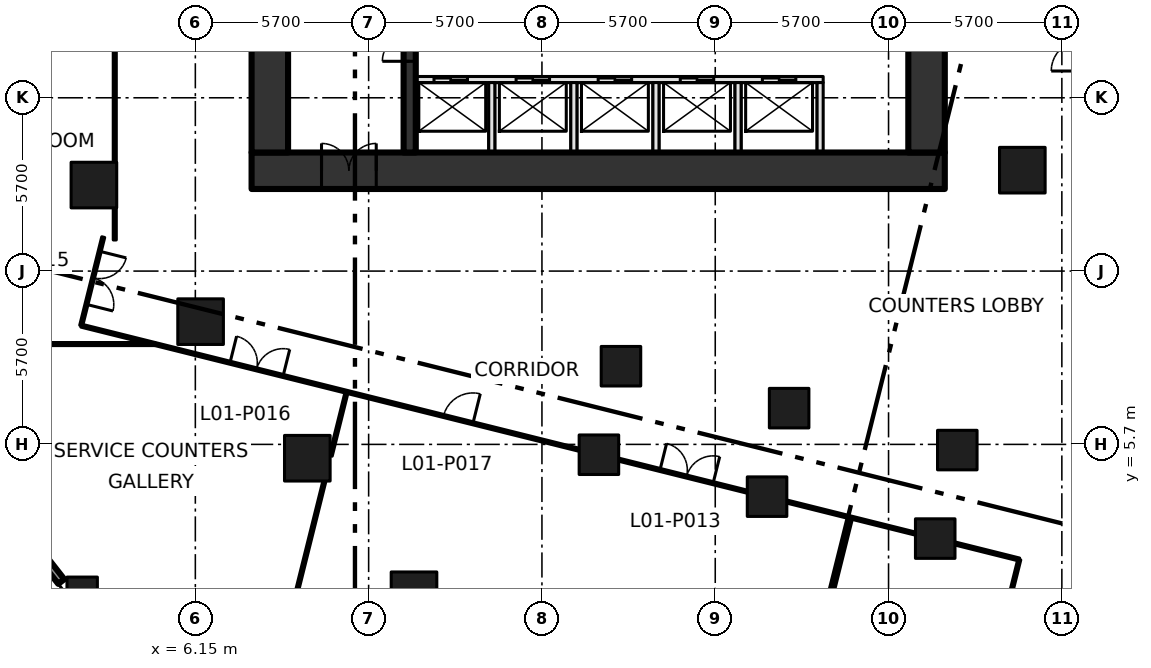
"""IFC4 building model, lengths in metres.
Left out: names, types, materials, properties, quantities, classifications, styles, units other than length and angle.
Written with IfcOpenShell. Run it as: python <this file> out.ifc"""

import sys

from ifc_helpers import new_model, si_unit, direction, frame, frame_2d, origin, origin_2d, place, context, subcontext, project, spatial, rectangle, extrude, element, fill, save


model = new_model("IFC4")
c1 = context("Model", 3, precision=1e-05, world=origin(), true_north=direction((0.0, 1.0)))
c2 = subcontext(c1, "Body", "Model", "MODEL_VIEW")
j1 = project(units=[si_unit("LENGTHUNIT", "METRE"), si_unit("PLANEANGLEUNIT", "RADIAN")], contexts=[c1])
p1 = place(None, origin())
s1 = spatial("IfcSite", under=j1, at=p1, CompositionType="ELEMENT")
p2 = place(p1, origin())
s2 = spatial("IfcBuilding", under=s1, at=p2, CompositionType="ELEMENT")
p3 = place(p2, frame((0.0, 0.0, 7.2)))
s3 = spatial("IfcBuildingStorey", under=s2, at=p3, CompositionType="ELEMENT", Elevation=7.2)
for number, where, z_axis, x_axis in (
    (1, (33.35, 14.719, 0.0), (0.0, 0.0, 1.0), (1.0, 0.0, 0.0)),
    (2, (13.342, 0.754, 0.0), (0.0, 0.0, 1.0), (1.0, 0.0, 0.0)),
    (3, (9.833, 5.245, 0.0), (0.0, 0.0, 1.0), (1.0, 0.0, 0.0)),
    (4, (6.323, 9.737, 0.0), (0.0, 0.0, 1.0), (1.0, 0.0, 0.0)),
    (5, (2.814, 14.229, 0.0), (0.0, 0.0, 1.0), (1.0, 0.0, 0.0)),
):
    element("IfcColumn", number, at=place(p3, frame(where, z_axis=z_axis, x_axis=x_axis)), inside=s3, PredefinedType="COLUMN", context=c2, shape_type="SweptSolid", body=[
        extrude(rectangle(XDim=1.5, YDim=1.5, at=origin_2d()), origin(), (0.0, 0.0, 1.0), 5.4),
    ])
for number, where, z_axis, x_axis in (
    (6, (19.424, 5.36, 0.0), (0.0, 0.0, 1.0), (1.0, 0.0, 0.0)),
    (7, (24.954, 3.981, 0.0), (0.0, 0.0, 1.0), (1.0, 0.0, 0.0)),
    (8, (30.485, 2.602, 0.0), (0.0, 0.0, 1.0), (1.0, 0.0, 0.0)),
    (9, (20.149, 8.271, 0.0), (0.0, 0.0, 1.0), (1.0, 0.0, 0.0)),
    (10, (25.68, 6.892, 0.0), (0.0, 0.0, 1.0), (1.0, 0.0, 0.0)),
    (11, (31.211, 5.513, 0.0), (0.0, 0.0, 1.0), (1.0, 0.0, 0.0)),
):
    element("IfcColumn", number, at=place(p3, frame(where, z_axis=z_axis, x_axis=x_axis)), inside=s3, PredefinedType="COLUMN", context=c2, shape_type="SweptSolid", body=[
        extrude(rectangle(XDim=1.3, YDim=1.3, at=origin_2d()), origin(), (0.0, 0.0, 1.0), 5.4),
    ])
p4 = place(p3, frame((2.428, 0.836, 0.0), z_axis=(0.0, 0.0, 1.0), x_axis=(1.0, 0.0, 0.0)))
e12 = element("IfcColumn", 12, at=p4, inside=s3, PredefinedType="COLUMN", context=c2, shape_type="SweptSolid", body=[
    extrude(rectangle(XDim=1.0, YDim=1.0, at=origin_2d()), origin(), (0.0, 0.0, 1.0), 5.4),
])
p5 = place(p3, frame((8.0, 14.7, -0.45), z_axis=(0.0, 0.0, 1.0), x_axis=(1.0, 0.0, 0.0)))
e13 = element("IfcWall", 13, at=p5, inside=s3, PredefinedType="SHEAR", context=c2, shape_type="SweptSolid", body=[
    extrude(rectangle(XDim=22.8, YDim=1.2, at=frame_2d((11.4, 0.0))), origin(), (0.0, 0.0, 1.0), 5.4),
])
p6 = place(p5, frame((2.3, 0.0, 0.45)))
e14 = element("IfcOpeningElement", 14, at=p6, cuts=e13, PredefinedType="OPENING", context=c2, shape_type="SweptSolid", body=[
    extrude(rectangle(XDim=1.8, YDim=2.1, at=frame_2d((0.9, 1.05))), frame((0.0, 0.61, 0.0), z_axis=(0.0, -1.0, 0.0), x_axis=(1.0, 0.0, 0.0)), (0.0, 0.0, 1.0), 1.22),
])
for number, where, z_axis, x_axis in (
    (15, (8.6, 15.3, -0.45), (0.0, 0.0, 1.0), (0.0, 1.0, 0.0)),
    (16, (30.2, 15.3, -0.45), (0.0, 0.0, 1.0), (0.0, 1.0, 0.0)),
):
    element("IfcWall", number, at=place(p3, frame(where, z_axis=z_axis, x_axis=x_axis)), inside=s3, PredefinedType="SHEAR", context=c2, shape_type="SweptSolid", body=[
        extrude(rectangle(XDim=20.4, YDim=1.2, at=frame_2d((10.2, 0.0))), origin(), (0.0, 0.0, 1.0), 5.4),
    ])
p7 = place(p3, frame((13.4, 17.7, 0.0), z_axis=(0.0, 0.0, 1.0), x_axis=(1.0, 0.0, 0.0)))
e17 = element("IfcWall", 17, at=p7, inside=s3, PredefinedType="SOLIDWALL", context=c2, shape_type="SweptSolid", body=[
    extrude(rectangle(XDim=13.4, YDim=0.2, at=frame_2d((6.7, 0.0))), origin(), (0.0, 0.0, 1.0), 4.95),
])
p8 = place(p7, frame((0.6, 0.0, 0.0)))
e18 = element("IfcOpeningElement", 18, at=p8, cuts=e17, PredefinedType="OPENING", context=c2, shape_type="SweptSolid", body=[
    extrude(rectangle(XDim=1.1, YDim=2.1, at=frame_2d((0.55, 1.05))), frame((0.0, 0.11, 0.0), z_axis=(0.0, -1.0, 0.0), x_axis=(1.0, 0.0, 0.0)), (0.0, 0.0, 1.0), 0.22),
])
p9 = place(p7, frame((3.3, 0.0, 0.0)))
e19 = element("IfcOpeningElement", 19, at=p9, cuts=e17, PredefinedType="OPENING", context=c2, shape_type="SweptSolid", body=[
    extrude(rectangle(XDim=1.1, YDim=2.1, at=frame_2d((0.55, 1.05))), frame((0.0, 0.11, 0.0), z_axis=(0.0, -1.0, 0.0), x_axis=(1.0, 0.0, 0.0)), (0.0, 0.0, 1.0), 0.22),
])
p10 = place(p7, frame((6.0, 0.0, 0.0)))
e20 = element("IfcOpeningElement", 20, at=p10, cuts=e17, PredefinedType="OPENING", context=c2, shape_type="SweptSolid", body=[
    extrude(rectangle(XDim=1.1, YDim=2.1, at=frame_2d((0.55, 1.05))), frame((0.0, 0.11, 0.0), z_axis=(0.0, -1.0, 0.0), x_axis=(1.0, 0.0, 0.0)), (0.0, 0.0, 1.0), 0.22),
])
p11 = place(p7, frame((8.7, 0.0, 0.0)))
e21 = element("IfcOpeningElement", 21, at=p11, cuts=e17, PredefinedType="OPENING", context=c2, shape_type="SweptSolid", body=[
    extrude(rectangle(XDim=1.1, YDim=2.1, at=frame_2d((0.55, 1.05))), frame((0.0, 0.11, 0.0), z_axis=(0.0, -1.0, 0.0), x_axis=(1.0, 0.0, 0.0)), (0.0, 0.0, 1.0), 0.22),
])
p12 = place(p7, frame((11.4, 0.0, 0.0)))
e22 = element("IfcOpeningElement", 22, at=p12, cuts=e17, PredefinedType="OPENING", context=c2, shape_type="SweptSolid", body=[
    extrude(rectangle(XDim=1.1, YDim=2.1, at=frame_2d((0.55, 1.05))), frame((0.0, 0.11, 0.0), z_axis=(0.0, -1.0, 0.0), x_axis=(1.0, 0.0, 0.0)), (0.0, 0.0, 1.0), 0.22),
])
p13 = place(p3, frame((13.2, 15.3, 0.0), z_axis=(0.0, 0.0, 1.0), x_axis=(0.0, 1.0, 0.0)))
e23 = element("IfcWall", 23, at=p13, inside=s3, PredefinedType="SHEAR", context=c2, shape_type="SweptSolid", body=[
    extrude(rectangle(XDim=20.4, YDim=0.4, at=frame_2d((10.2, 0.0))), origin(), (0.0, 0.0, 1.0), 4.95),
])
p14 = place(p13, frame((3.0, 0.0, 0.0)))
e24 = element("IfcOpeningElement", 24, at=p14, cuts=e23, PredefinedType="OPENING", context=c2, shape_type="SweptSolid", body=[
    extrude(rectangle(XDim=1.8, YDim=2.1, at=frame_2d((0.9, 1.05))), frame((0.0, 0.21, 0.0), z_axis=(0.0, -1.0, 0.0), x_axis=(1.0, 0.0, 0.0)), (0.0, 0.0, 1.0), 0.42),
])
p15 = place(p13, frame((11.1, 0.0, 0.0)))
e25 = element("IfcOpeningElement", 25, at=p15, cuts=e23, PredefinedType="OPENING", context=c2, shape_type="SweptSolid", body=[
    extrude(rectangle(XDim=1.2, YDim=2.1, at=frame_2d((0.6, 1.05))), frame((0.0, 0.21, 0.0), z_axis=(0.0, -1.0, 0.0), x_axis=(1.0, 0.0, 0.0)), (0.0, 0.0, 1.0), 0.42),
])
for number, where, z_axis, x_axis in (
    (26, (15.9, 15.3, 0.0), (0.0, 0.0, 1.0), (0.0, 1.0, 0.0)),
    (27, (18.6, 15.3, 0.0), (0.0, 0.0, 1.0), (0.0, 1.0, 0.0)),
    (28, (21.3, 15.3, 0.0), (0.0, 0.0, 1.0), (0.0, 1.0, 0.0)),
    (29, (24.0, 15.3, 0.0), (0.0, 0.0, 1.0), (0.0, 1.0, 0.0)),
    (30, (26.7, 15.3, 0.0), (0.0, 0.0, 1.0), (0.0, 1.0, 0.0)),
):
    element("IfcWall", number, at=place(p3, frame(where, z_axis=z_axis, x_axis=x_axis)), inside=s3, PredefinedType="SOLIDWALL", context=c2, shape_type="SweptSolid", body=[
        extrude(rectangle(XDim=2.3, YDim=0.2, at=frame_2d((1.15, 0.0))), origin(), (0.0, 0.0, 1.0), 4.95),
    ])
p16 = place(p3, frame((2.395, 9.606, 0.0), z_axis=(0.0, 0.0, 1.0), x_axis=(0.970307527636, -0.241874558011, 0.0)))
e31 = element("IfcWall", 31, at=p16, inside=s3, PredefinedType="PARTITIONING", context=c2, shape_type="SweptSolid", body=[
    extrude(rectangle(XDim=16.859, YDim=0.1, at=frame_2d((8.43, 0.0))), origin(), (0.0, 0.0, 1.0), 4.95),
])
p17 = place(p16, frame((5.045, 0.0, 0.0)))
e32 = element("IfcOpeningElement", 32, at=p17, cuts=e31, PredefinedType="OPENING", context=c2, shape_type="SweptSolid", body=[
    extrude(rectangle(XDim=1.8, YDim=2.1, at=frame_2d((0.9, 1.05))), frame((0.0, 0.06, 0.0), z_axis=(0.0, -1.0, 0.0), x_axis=(1.0, 0.0, 0.0)), (0.0, 0.0, 1.0), 0.12),
])
p18 = place(p16, frame((12.28, 0.0, 0.0)))
e33 = element("IfcOpeningElement", 33, at=p18, cuts=e31, PredefinedType="OPENING", context=c2, shape_type="SweptSolid", body=[
    extrude(rectangle(XDim=1.0, YDim=2.1, at=frame_2d((0.5, 1.05))), frame((0.0, 0.06, 0.0), z_axis=(0.0, -1.0, 0.0), x_axis=(1.0, 0.0, 0.0)), (0.0, 0.0, 1.0), 0.12),
])
p19 = place(p3, frame((3.121, 12.517, 0.0), z_axis=(0.0, 0.0, 1.0), x_axis=(-0.241999491975, -0.970276376031, 0.0)))
e34 = element("IfcWall", 34, at=p19, inside=s3, PredefinedType="PARTITIONING", context=c2, shape_type="SweptSolid", body=[
    extrude(rectangle(XDim=3.0, YDim=0.1, at=frame_2d((1.5, 0.0))), origin(), (0.0, 0.0, 1.0), 4.95),
])
p20 = place(p19, frame((0.48, 0.0, 0.0)))
e35 = element("IfcOpeningElement", 35, at=p20, cuts=e34, PredefinedType="OPENING", context=c2, shape_type="SweptSolid", body=[
    extrude(rectangle(XDim=1.8, YDim=2.1, at=frame_2d((0.9, 1.05))), frame((0.0, 0.06, 0.0), z_axis=(0.0, -1.0, 0.0), x_axis=(1.0, 0.0, 0.0)), (0.0, 0.0, 1.0), 0.12),
])
p21 = place(p3, frame((3.5, 13.459, 0.0), z_axis=(0.0, 0.0, 1.0), x_axis=(0.0, -1.0, 0.0)))
e36 = element("IfcWall", 36, at=p21, inside=s3, PredefinedType="PARTITIONING", context=c2, shape_type="SweptSolid", body=[
    extrude(rectangle(XDim=1.036, YDim=0.1, at=frame_2d((0.518, 0.0))), origin(), (0.0, 0.0, 1.0), 4.95),
])
p22 = place(p3, frame((3.5, 14.999, 0.0), z_axis=(0.0, 0.0, 1.0), x_axis=(0.0, 1.0, 0.0)))
e37 = element("IfcWall", 37, at=p22, inside=s3, PredefinedType="PARTITIONING", context=c2, shape_type="SweptSolid", body=[
    extrude(rectangle(XDim=26.401, YDim=0.1, at=frame_2d((13.2, 0.0))), origin(), (0.0, 0.0, 1.0), 4.95),
])
p23 = place(p22, frame((9.881, 0.0, 0.0)))
e38 = element("IfcOpeningElement", 38, at=p23, cuts=e37, PredefinedType="OPENING", context=c2, shape_type="SweptSolid", body=[
    extrude(rectangle(XDim=1.8, YDim=2.1, at=frame_2d((0.9, 1.05))), frame((0.0, 0.06, 0.0), z_axis=(0.0, -1.0, 0.0), x_axis=(1.0, 0.0, 0.0)), (0.0, 0.0, 1.0), 0.12),
])
p24 = place(p22, frame((19.081, 0.0, 0.0)))
e39 = element("IfcOpeningElement", 39, at=p24, cuts=e37, PredefinedType="OPENING", context=c2, shape_type="SweptSolid", body=[
    extrude(rectangle(XDim=1.0, YDim=2.1, at=frame_2d((0.5, 1.05))), frame((0.0, 0.06, 0.0), z_axis=(0.0, -1.0, 0.0), x_axis=(1.0, 0.0, 0.0)), (0.0, 0.0, 1.0), 0.12),
])
p25 = place(p22, frame((23.581, 0.0, 0.0)))
e40 = element("IfcOpeningElement", 40, at=p25, cuts=e37, PredefinedType="OPENING", context=c2, shape_type="SweptSolid", body=[
    extrude(rectangle(XDim=1.8, YDim=2.1, at=frame_2d((0.9, 1.05))), frame((0.0, 0.06, 0.0), z_axis=(0.0, -1.0, 0.0), x_axis=(1.0, 0.0, 0.0)), (0.0, 0.0, 1.0), 0.12),
])
p26 = place(p3, frame((20.094, 5.193, 0.0), z_axis=(0.0, 0.0, 1.0), x_axis=(0.970321828551, -0.241817181023, 0.0)))
e41 = element("IfcWall", 41, at=p26, inside=s3, PredefinedType="PARTITIONING", context=c2, shape_type="SweptSolid", body=[
    extrude(rectangle(XDim=4.318, YDim=0.1, at=frame_2d((2.159, 0.0))), origin(), (0.0, 0.0, 1.0), 4.95),
])
p27 = place(p26, frame((1.38, 0.0, 0.0)))
e42 = element("IfcOpeningElement", 42, at=p27, cuts=e41, PredefinedType="OPENING", context=c2, shape_type="SweptSolid", body=[
    extrude(rectangle(XDim=1.8, YDim=2.1, at=frame_2d((0.9, 1.05))), frame((0.0, 0.06, 0.0), z_axis=(0.0, -1.0, 0.0), x_axis=(1.0, 0.0, 0.0)), (0.0, 0.0, 1.0), 0.12),
])
p28 = place(p3, frame((25.624, 3.815, 0.0), z_axis=(0.0, 0.0, 1.0), x_axis=(0.970295255208, -0.241923784941, 0.0)))
e43 = element("IfcWall", 43, at=p28, inside=s3, PredefinedType="PARTITIONING", context=c2, shape_type="SweptSolid", body=[
    extrude(rectangle(XDim=4.319, YDim=0.1, at=frame_2d((2.16, 0.0))), origin(), (0.0, 0.0, 1.0), 4.95),
])
p29 = place(p3, frame((31.155, 2.436, 0.0), z_axis=(0.0, 0.0, 1.0), x_axis=(0.970255412337, -0.242083528623, 0.0)))
e44 = element("IfcWall", 44, at=p29, inside=s3, PredefinedType="PARTITIONING", context=c2, shape_type="SweptSolid", body=[
    extrude(rectangle(XDim=2.16, YDim=0.1, at=frame_2d((1.08, 0.0))), origin(), (0.0, 0.0, 1.0), 4.95),
])
p30 = place(p3, frame((33.251, 1.913, 0.0), z_axis=(0.0, 0.0, 1.0), x_axis=(-0.241952442696, -0.970288109519, 0.0)))
e45 = element("IfcWall", 45, at=p30, inside=s3, PredefinedType="PARTITIONING", context=c2, shape_type="SweptSolid", body=[
    extrude(rectangle(XDim=6.6, YDim=0.1, at=frame_2d((3.3, 0.0))), origin(), (0.0, 0.0, 1.0), 4.95),
])
p31 = place(p3, frame((-4.205, 9.0, 0.0), z_axis=(0.0, 0.0, 1.0), x_axis=(1.0, 0.0, 0.0)))
e46 = element("IfcWall", 46, at=p31, inside=s3, PredefinedType="PARTITIONING", context=c2, shape_type="SweptSolid", body=[
    extrude(rectangle(XDim=9.031, YDim=0.1, at=frame_2d((4.515, 0.0))), origin(), (0.0, 0.0, 1.0), 4.95),
])
p32 = place(p3, frame((7.716, -6.257, 0.0), z_axis=(0.0, 0.0, 1.0), x_axis=(0.241891576484, 0.970303285177, 0.0)))
e47 = element("IfcWall", 47, at=p32, inside=s3, PredefinedType="PARTITIONING", context=c2, shape_type="SweptSolid", body=[
    extrude(rectangle(XDim=11.061, YDim=0.1, at=frame_2d((5.53, 0.0))), origin(), (0.0, 0.0, 1.0), 4.95),
])
p33 = place(p3, frame((10.603, 5.323, 0.0), z_axis=(0.0, 0.0, 1.0), x_axis=(0.241966521302, 0.970284598749, 0.0)))
e48 = element("IfcWall", 48, at=p33, inside=s3, PredefinedType="PARTITIONING", context=c2, shape_type="SweptSolid", body=[
    extrude(rectangle(XDim=2.12, YDim=0.1, at=frame_2d((1.06, 0.0))), origin(), (0.0, 0.0, 1.0), 4.95),
])
p34 = place(p3, frame((23.507, -13.601, 0.0), z_axis=(0.0, 0.0, 1.0), x_axis=(0.24198959429, 0.970278844588, 0.0)))
e49 = element("IfcWall", 49, at=p34, inside=s3, PredefinedType="PARTITIONING", context=c2, shape_type="SweptSolid", body=[
    extrude(rectangle(XDim=17.36, YDim=0.1, at=frame_2d((8.68, 0.0))), origin(), (0.0, 0.0, 1.0), 4.95),
])
p35 = place(p3, frame((-0.906, 4.575, 0.0), z_axis=(0.0, 0.0, 1.0), x_axis=(0.61574436495, -0.787945986113, 0.0)))
e50 = element("IfcWall", 50, at=p35, inside=s3, PredefinedType="SOLIDWALL", context=c2, shape_type="SweptSolid", body=[
    extrude(rectangle(XDim=4.297, YDim=0.25, at=frame_2d((2.148, 0.0))), origin(), (0.0, 0.0, 1.0), 4.05),
])
p36 = place(p35, frame((0.949, 0.0, 0.9)))
e51 = element("IfcOpeningElement", 51, at=p36, cuts=e50, PredefinedType="OPENING", context=c2, shape_type="SweptSolid", body=[
    extrude(rectangle(XDim=2.4, YDim=2.7, at=frame_2d((1.2, 1.35))), frame((0.0, 0.135, 0.0), z_axis=(0.0, -1.0, 0.0), x_axis=(1.0, 0.0, 0.0)), (0.0, 0.0, 1.0), 0.27),
])
p37 = place(p8, origin())
e52 = element("IfcDoor", 52, at=p37, inside=s3, OperationType="SLIDING_TO_LEFT", PredefinedType="DOOR", context=c2, shape_type="SweptSolid", body=[
    extrude(rectangle(XDim=1.1, YDim=2.1, at=frame_2d((0.55, 1.05))), frame((0.0, 0.025, 0.0), z_axis=(0.0, -1.0, 0.0), x_axis=(1.0, 0.0, 0.0)), (0.0, 0.0, 1.0), 0.05),
])
fill(e18, e52)
p38 = place(p9, origin())
e53 = element("IfcDoor", 53, at=p38, inside=s3, OperationType="SLIDING_TO_LEFT", PredefinedType="DOOR", context=c2, shape_type="SweptSolid", body=[
    extrude(rectangle(XDim=1.1, YDim=2.1, at=frame_2d((0.55, 1.05))), frame((0.0, 0.025, 0.0), z_axis=(0.0, -1.0, 0.0), x_axis=(1.0, 0.0, 0.0)), (0.0, 0.0, 1.0), 0.05),
])
fill(e19, e53)
p39 = place(p10, origin())
e54 = element("IfcDoor", 54, at=p39, inside=s3, OperationType="SLIDING_TO_LEFT", PredefinedType="DOOR", context=c2, shape_type="SweptSolid", body=[
    extrude(rectangle(XDim=1.1, YDim=2.1, at=frame_2d((0.55, 1.05))), frame((0.0, 0.025, 0.0), z_axis=(0.0, -1.0, 0.0), x_axis=(1.0, 0.0, 0.0)), (0.0, 0.0, 1.0), 0.05),
])
fill(e20, e54)
p40 = place(p11, origin())
e55 = element("IfcDoor", 55, at=p40, inside=s3, OperationType="SLIDING_TO_LEFT", PredefinedType="DOOR", context=c2, shape_type="SweptSolid", body=[
    extrude(rectangle(XDim=1.1, YDim=2.1, at=frame_2d((0.55, 1.05))), frame((0.0, 0.025, 0.0), z_axis=(0.0, -1.0, 0.0), x_axis=(1.0, 0.0, 0.0)), (0.0, 0.0, 1.0), 0.05),
])
fill(e21, e55)
p41 = place(p12, origin())
e56 = element("IfcDoor", 56, at=p41, inside=s3, OperationType="SLIDING_TO_LEFT", PredefinedType="DOOR", context=c2, shape_type="SweptSolid", body=[
    extrude(rectangle(XDim=1.1, YDim=2.1, at=frame_2d((0.55, 1.05))), frame((0.0, 0.025, 0.0), z_axis=(0.0, -1.0, 0.0), x_axis=(1.0, 0.0, 0.0)), (0.0, 0.0, 1.0), 0.05),
])
fill(e22, e56)
p42 = place(p14, origin())
e57 = element("IfcDoor", 57, at=p42, inside=s3, OperationType="DOUBLE_DOOR_SINGLE_SWING", PredefinedType="DOOR", context=c2, shape_type="SweptSolid", body=[
    extrude(rectangle(XDim=1.8, YDim=2.1, at=frame_2d((0.9, 1.05))), frame((0.0, 0.025, 0.0), z_axis=(0.0, -1.0, 0.0), x_axis=(1.0, 0.0, 0.0)), (0.0, 0.0, 1.0), 0.05),
])
fill(e24, e57)
p43 = place(p6, origin())
e58 = element("IfcDoor", 58, at=p43, inside=s3, OperationType="DOUBLE_DOOR_SINGLE_SWING", PredefinedType="DOOR", context=c2, shape_type="SweptSolid", body=[
    extrude(rectangle(XDim=1.8, YDim=2.1, at=frame_2d((0.9, 1.05))), frame((0.0, 0.025, 0.0), z_axis=(0.0, -1.0, 0.0), x_axis=(1.0, 0.0, 0.0)), (0.0, 0.0, 1.0), 0.05),
])
fill(e14, e58)
p44 = place(p27, origin())
e59 = element("IfcDoor", 59, at=p44, inside=s3, OperationType="DOUBLE_DOOR_SINGLE_SWING", PredefinedType="DOOR", context=c2, shape_type="SweptSolid", body=[
    extrude(rectangle(XDim=1.8, YDim=2.1, at=frame_2d((0.9, 1.05))), frame((0.0, 0.025, 0.0), z_axis=(0.0, -1.0, 0.0), x_axis=(1.0, 0.0, 0.0)), (0.0, 0.0, 1.0), 0.05),
])
fill(e42, e59)
p45 = place(p20, origin())
e60 = element("IfcDoor", 60, at=p45, inside=s3, OperationType="DOUBLE_DOOR_SINGLE_SWING", PredefinedType="DOOR", context=c2, shape_type="SweptSolid", body=[
    extrude(rectangle(XDim=1.8, YDim=2.1, at=frame_2d((0.9, 1.05))), frame((0.0, 0.025, 0.0), z_axis=(0.0, -1.0, 0.0), x_axis=(1.0, 0.0, 0.0)), (0.0, 0.0, 1.0), 0.05),
])
fill(e35, e60)
p46 = place(p17, origin())
e61 = element("IfcDoor", 61, at=p46, inside=s3, OperationType="DOUBLE_DOOR_SINGLE_SWING", PredefinedType="DOOR", context=c2, shape_type="SweptSolid", body=[
    extrude(rectangle(XDim=1.8, YDim=2.1, at=frame_2d((0.9, 1.05))), frame((0.0, 0.025, 0.0), z_axis=(0.0, -1.0, 0.0), x_axis=(1.0, 0.0, 0.0)), (0.0, 0.0, 1.0), 0.05),
])
fill(e32, e61)
p47 = place(p18, origin())
e62 = element("IfcDoor", 62, at=p47, inside=s3, OperationType="SINGLE_SWING_RIGHT", PredefinedType="DOOR", context=c2, shape_type="SweptSolid", body=[
    extrude(rectangle(XDim=1.0, YDim=2.1, at=frame_2d((0.5, 1.05))), frame((0.0, 0.025, 0.0), z_axis=(0.0, -1.0, 0.0), x_axis=(1.0, 0.0, 0.0)), (0.0, 0.0, 1.0), 0.05),
])
fill(e33, e62)
save(model, sys.argv[1])
